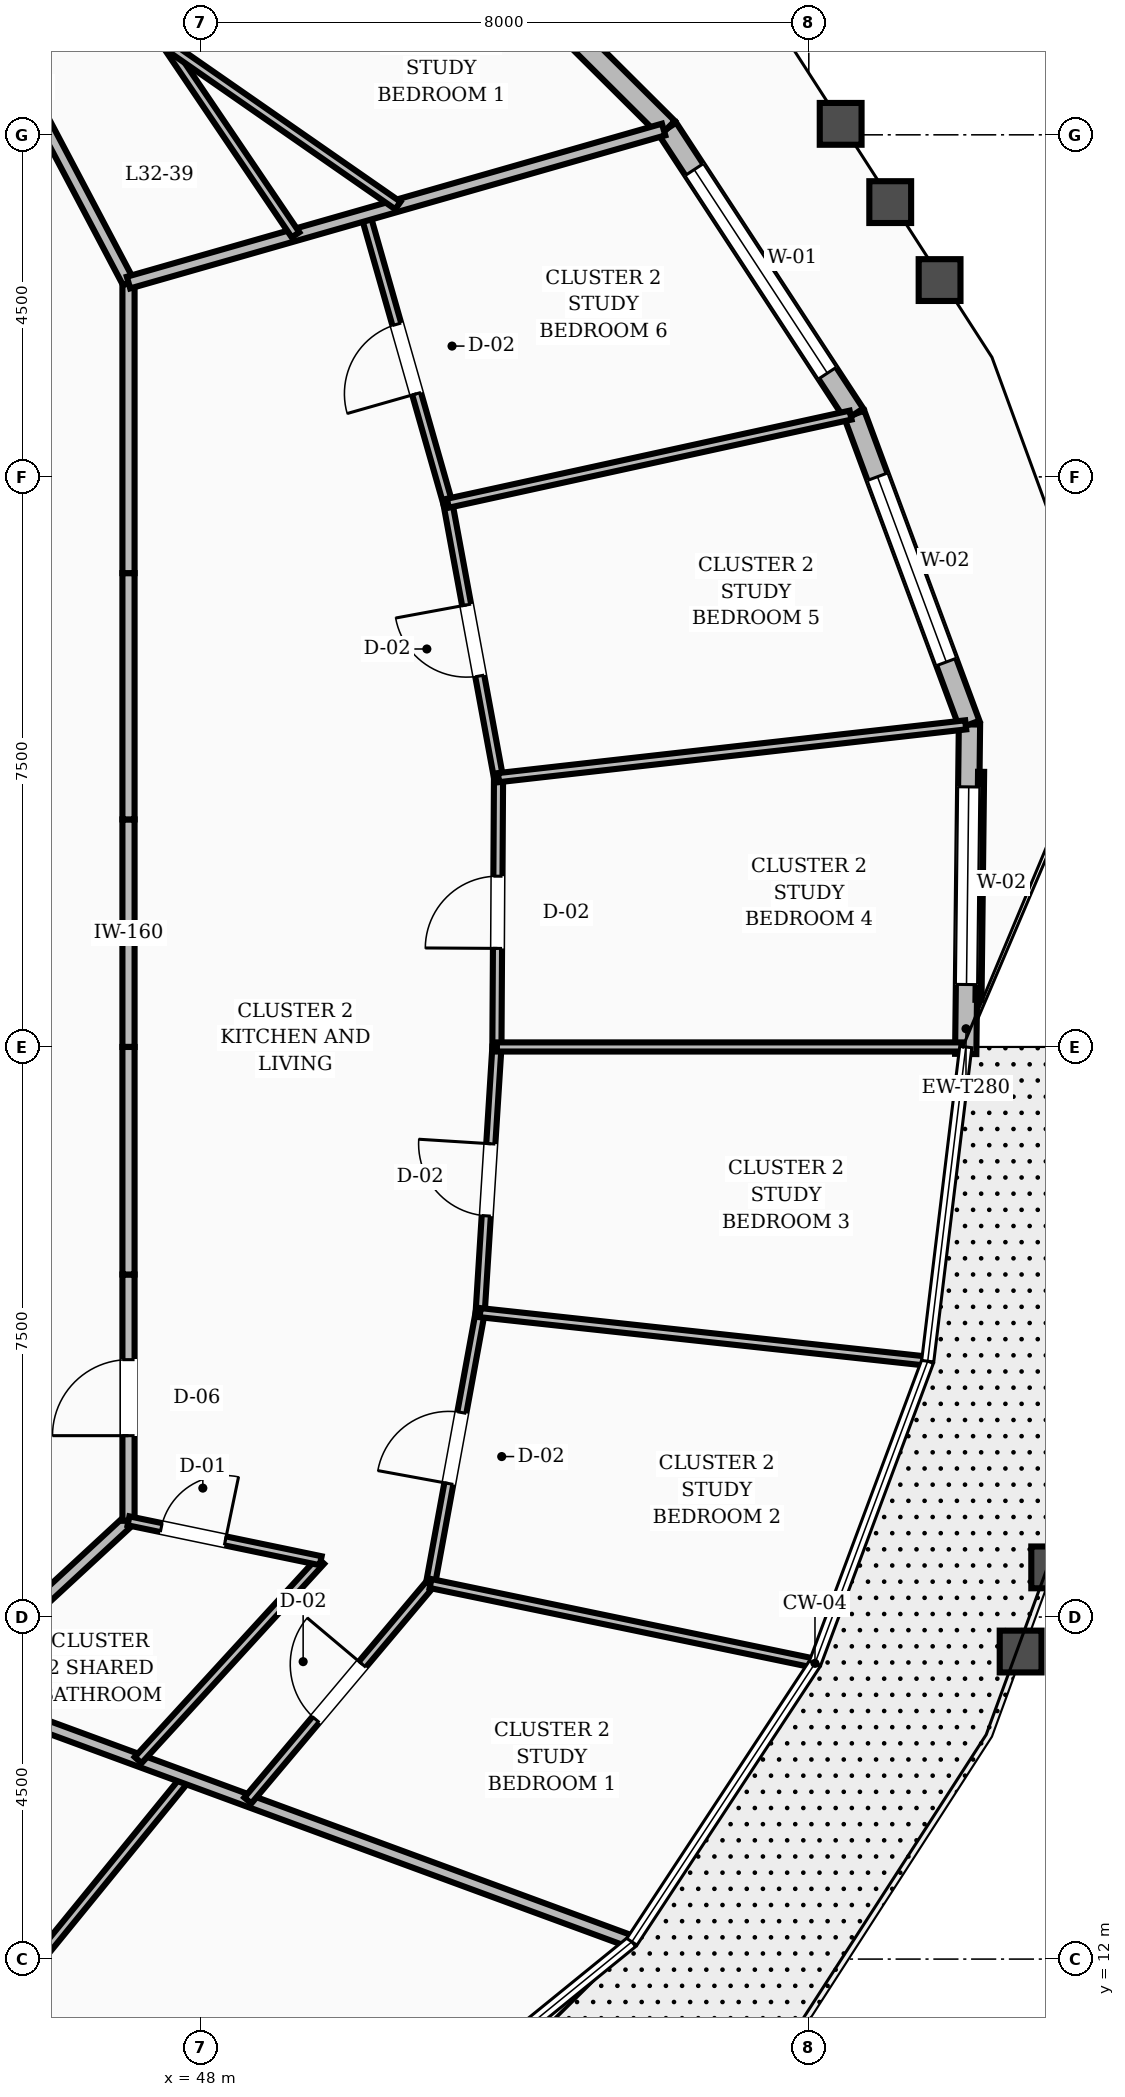
"""IFC4 building model, lengths in metres.
Left out: names, types, materials, properties, quantities, classifications, styles, units other than length and angle.
Written with IfcOpenShell. Run it as: python <this file> out.ifc"""

import sys

from ifc_helpers import new_model, si_unit, direction, frame, frame_2d, origin, place, context, subcontext, project, spatial, rectangle, extrude, element, fill, save


model = new_model("IFC4")
c1 = context("Model", 3, precision=1e-05, world=origin(), true_north=direction((0.0, 1.0)))
c2 = subcontext(c1, "Body", "Model", "MODEL_VIEW")
j1 = project(units=[si_unit("LENGTHUNIT", "METRE"), si_unit("PLANEANGLEUNIT", "RADIAN")], contexts=[c1])
p1 = place(None, origin())
s1 = spatial("IfcSite", under=j1, at=p1, CompositionType="ELEMENT")
p2 = place(p1, origin())
s2 = spatial("IfcBuilding", under=s1, at=p2, CompositionType="ELEMENT")
p3 = place(p2, frame((0.0, 0.0, 128.0)))
s3 = spatial("IfcBuildingStorey", under=s2, at=p3, CompositionType="ELEMENT", Elevation=128.0)
p4 = place(p3, frame((58.064, 23.908, 0.0), z_axis=(0.0, 0.0, 1.0), x_axis=(0.011431364304, 0.99993465982, 0.0)))
e1 = element("IfcWall", 1, at=p4, inside=s3, PredefinedType="STANDARD", context=c2, shape_type="SweptSolid", body=[
    extrude(rectangle(XDim=4.335, YDim=0.28, at=frame_2d((2.168, 0.0))), origin(), (0.0, 0.0, 1.0), 2.82),
])
p5 = place(p4, frame((0.914, 0.0, 0.8)))
e2 = element("IfcOpeningElement", 2, at=p5, cuts=e1, PredefinedType="OPENING", context=c2, shape_type="SweptSolid", body=[
    extrude(rectangle(XDim=2.6, YDim=1.65, at=frame_2d((1.3, 0.825))), frame((0.0, 0.15, 0.0), z_axis=(0.0, -1.0, 0.0), x_axis=(1.0, 0.0, 0.0)), (0.0, 0.0, 1.0), 0.3),
])
p6 = place(p3, frame((58.114, 28.243, 0.0), z_axis=(0.0, 0.0, 1.0), x_axis=(-0.348121742576, 0.937449333215, 0.0)))
e3 = element("IfcWall", 3, at=p6, inside=s3, PredefinedType="STANDARD", context=c2, shape_type="SweptSolid", body=[
    extrude(rectangle(XDim=4.352, YDim=0.28, at=frame_2d((2.176, 0.0))), origin(), (0.0, 0.0, 1.0), 2.82),
])
p7 = place(p6, frame((0.876, 0.0, 0.8)))
e4 = element("IfcOpeningElement", 4, at=p7, cuts=e3, PredefinedType="OPENING", context=c2, shape_type="SweptSolid", body=[
    extrude(rectangle(XDim=2.6, YDim=1.65, at=frame_2d((1.3, 0.825))), frame((0.0, 0.15, 0.0), z_axis=(0.0, -1.0, 0.0), x_axis=(1.0, 0.0, 0.0)), (0.0, 0.0, 1.0), 0.3),
])
p8 = place(p3, frame((56.599, 32.323, 0.0), z_axis=(0.0, 0.0, 1.0), x_axis=(-0.547571349255, 0.836758996053, 0.0)))
e5 = element("IfcWall", 5, at=p8, inside=s3, PredefinedType="STANDARD", context=c2, shape_type="SweptSolid", body=[
    extrude(rectangle(XDim=4.494, YDim=0.28, at=frame_2d((2.247, 0.0))), origin(), (0.0, 0.0, 1.0), 2.82),
])
p9 = place(p8, frame((0.647, 0.0, 0.8)))
e6 = element("IfcOpeningElement", 6, at=p9, cuts=e5, PredefinedType="OPENING", context=c2, shape_type="SweptSolid", body=[
    extrude(rectangle(XDim=3.2, YDim=1.65, at=frame_2d((1.6, 0.825))), frame((0.0, 0.15, 0.0), z_axis=(0.0, -1.0, 0.0), x_axis=(1.0, 0.0, 0.0)), (0.0, 0.0, 1.0), 0.3),
])
p10 = place(p3, frame((54.138, 36.083, 0.0), z_axis=(0.0, 0.0, 1.0), x_axis=(-0.708724927863, 0.705484923032, 0.0)))
e7 = element("IfcWall", 7, at=p10, inside=s3, PredefinedType="STANDARD", context=c2, shape_type="SweptSolid", body=[
    extrude(rectangle(XDim=4.672, YDim=0.28, at=frame_2d((2.336, 0.0))), origin(), (0.0, 0.0, 1.0), 2.82),
])
p11 = place(p3, frame((47.05, 24.0, 0.0), z_axis=(0.0, 0.0, 1.0), x_axis=(0.0, 1.0, 0.0)))
e8 = element("IfcWall", 8, at=p11, inside=s3, PredefinedType="SOLIDWALL", context=c2, shape_type="SweptSolid", body=[
    extrude(rectangle(XDim=2.994, YDim=0.16, at=frame_2d((1.497, 0.0))), origin(), (0.0, 0.0, 1.0), 2.8),
])
p12 = place(p3, frame((47.05, 26.994, 0.0), z_axis=(0.0, 0.0, 1.0), x_axis=(0.0, 1.0, 0.0)))
e9 = element("IfcWall", 9, at=p12, inside=s3, PredefinedType="SOLIDWALL", context=c2, shape_type="SweptSolid", body=[
    extrude(rectangle(XDim=3.24, YDim=0.16, at=frame_2d((1.62, 0.0))), origin(), (0.0, 0.0, 1.0), 2.8),
])
p13 = place(p3, frame((47.05, 30.234, 0.0), z_axis=(0.0, 0.0, 1.0), x_axis=(0.0, 1.0, 0.0)))
e10 = element("IfcWall", 10, at=p13, inside=s3, PredefinedType="SOLIDWALL", context=c2, shape_type="SweptSolid", body=[
    extrude(rectangle(XDim=3.822, YDim=0.16, at=frame_2d((1.911, 0.0))), origin(), (0.0, 0.0, 1.0), 2.8),
])
p14 = place(p3, frame((47.05, 34.056, 0.0), z_axis=(0.0, 0.0, 1.0), x_axis=(-0.466737093093, 0.884396113702, 0.0)))
e11 = element("IfcWall", 11, at=p14, inside=s3, PredefinedType="SOLIDWALL", context=c2, shape_type="SweptSolid", body=[
    extrude(rectangle(XDim=3.696, YDim=0.16, at=frame_2d((1.848, 0.0))), origin(), (0.0, 0.0, 1.0), 2.8),
])
p15 = place(p3, frame((44.65, 15.548, 0.0), z_axis=(0.0, 0.0, 1.0), x_axis=(0.734347936521, 0.678773237633, 0.0)))
e12 = element("IfcWall", 12, at=p15, inside=s3, PredefinedType="SOLIDWALL", context=c2, shape_type="SweptSolid", body=[
    extrude(rectangle(XDim=3.268, YDim=0.16, at=frame_2d((1.634, 0.0))), origin(), (0.0, 0.0, 1.0), 2.8),
])
p16 = place(p3, frame((47.05, 17.766, 0.0), z_axis=(0.0, 0.0, 1.0), x_axis=(0.0, 1.0, 0.0)))
e13 = element("IfcWall", 13, at=p16, inside=s3, PredefinedType="SOLIDWALL", context=c2, shape_type="SweptSolid", body=[
    extrude(rectangle(XDim=3.24, YDim=0.16, at=frame_2d((1.62, 0.0))), origin(), (0.0, 0.0, 1.0), 2.8),
])
p17 = place(p16, frame((1.12, 0.0, 0.0)))
e14 = element("IfcOpeningElement", 14, at=p17, cuts=e13, PredefinedType="OPENING", context=c2, shape_type="SweptSolid", body=[
    extrude(rectangle(XDim=1.0, YDim=2.1, at=frame_2d((0.5, 1.05))), frame((0.0, 0.09, 0.0), z_axis=(0.0, -1.0, 0.0), x_axis=(1.0, 0.0, 0.0)), (0.0, 0.0, 1.0), 0.18),
])
p18 = place(p3, frame((47.05, 21.006, 0.0), z_axis=(0.0, 0.0, 1.0), x_axis=(0.0, 1.0, 0.0)))
e15 = element("IfcWall", 15, at=p18, inside=s3, PredefinedType="SOLIDWALL", context=c2, shape_type="SweptSolid", body=[
    extrude(rectangle(XDim=2.994, YDim=0.16, at=frame_2d((1.497, 0.0))), origin(), (0.0, 0.0, 1.0), 2.8),
])
p19 = place(p3, frame((45.568, 11.638, 0.0), z_axis=(0.0, 0.0, 1.0), x_axis=(0.631833921948, 0.775103796324, 0.0)))
e16 = element("IfcWall", 16, at=p19, inside=s3, PredefinedType="PARTITIONING", context=c2, shape_type="SweptSolid", body=[
    extrude(rectangle(XDim=3.544, YDim=0.12, at=frame_2d((1.772, 0.0))), origin(), (0.0, 0.0, 1.0), 2.8),
])
p20 = place(p3, frame((44.65, 15.548, 0.0), z_axis=(0.0, 0.0, 1.0), x_axis=(0.938483808639, -0.345323241215, 0.0)))
e17 = element("IfcWall", 17, at=p20, inside=s3, PredefinedType="SOLIDWALL", context=c2, shape_type="SweptSolid", body=[
    extrude(rectangle(XDim=9.564, YDim=0.16, at=frame_2d((4.782, 0.0))), origin(), (0.0, 0.0, 1.0), 2.8),
])
p21 = place(p3, frame((47.177, 14.618, 0.0), z_axis=(0.0, 0.0, 1.0), x_axis=(0.675367129761, 0.737481687935, 0.0)))
e18 = element("IfcWall", 18, at=p21, inside=s3, PredefinedType="PARTITIONING", context=c2, shape_type="SweptSolid", body=[
    extrude(rectangle(XDim=3.557, YDim=0.12, at=frame_2d((1.779, 0.0))), origin(), (0.0, 0.0, 1.0), 2.8),
])
p22 = place(p3, frame((47.05, 17.766, 0.0), z_axis=(0.0, 0.0, 1.0), x_axis=(0.979129578615, -0.203236975673, 0.0)))
e19 = element("IfcWall", 19, at=p22, inside=s3, PredefinedType="PARTITIONING", context=c2, shape_type="SweptSolid", body=[
    extrude(rectangle(XDim=2.583, YDim=0.12, at=frame_2d((1.292, 0.0))), origin(), (0.0, 0.0, 1.0), 2.8),
])
p23 = place(p22, frame((0.44, 0.0, 0.0)))
e20 = element("IfcOpeningElement", 20, at=p23, cuts=e19, PredefinedType="OPENING", context=c2, shape_type="SweptSolid", body=[
    extrude(rectangle(XDim=0.86, YDim=2.1, at=frame_2d((0.43, 1.05))), frame((0.0, 0.07, 0.0), z_axis=(0.0, -1.0, 0.0), x_axis=(1.0, 0.0, 0.0)), (0.0, 0.0, 1.0), 0.14),
])
p24 = place(p3, frame((48.62, 14.087, 0.0), z_axis=(0.0, 0.0, 1.0), x_axis=(0.644101495502, 0.764940039148, 0.0)))
e21 = element("IfcWall", 21, at=p24, inside=s3, PredefinedType="PARTITIONING", context=c2, shape_type="SweptSolid", body=[
    extrude(rectangle(XDim=3.732, YDim=0.12, at=frame_2d((1.866, 0.0))), origin(), (0.0, 0.0, 1.0), 2.8),
])
p25 = place(p24, frame((1.391, 0.0, 0.0)))
e22 = element("IfcOpeningElement", 22, at=p25, cuts=e21, PredefinedType="OPENING", context=c2, shape_type="SweptSolid", body=[
    extrude(rectangle(XDim=0.95, YDim=2.1, at=frame_2d((0.475, 1.05))), frame((0.0, 0.07, 0.0), z_axis=(0.0, -1.0, 0.0), x_axis=(1.0, 0.0, 0.0)), (0.0, 0.0, 1.0), 0.14),
])
p26 = place(p3, frame((51.024, 16.941, 0.0), z_axis=(0.0, 0.0, 1.0), x_axis=(0.180201816071, 0.983629658705, 0.0)))
e23 = element("IfcWall", 23, at=p26, inside=s3, PredefinedType="PARTITIONING", context=c2, shape_type="SweptSolid", body=[
    extrude(rectangle(XDim=3.623, YDim=0.12, at=frame_2d((1.812, 0.0))), origin(), (0.0, 0.0, 1.0), 2.8),
])
p27 = place(p26, frame((1.336, 0.0, 0.0)))
e24 = element("IfcOpeningElement", 24, at=p27, cuts=e23, PredefinedType="OPENING", context=c2, shape_type="SweptSolid", body=[
    extrude(rectangle(XDim=0.95, YDim=2.1, at=frame_2d((0.475, 1.05))), frame((0.0, 0.07, 0.0), z_axis=(0.0, -1.0, 0.0), x_axis=(1.0, 0.0, 0.0)), (0.0, 0.0, 1.0), 0.14),
])
p28 = place(p3, frame((51.024, 16.941, 0.0), z_axis=(0.0, 0.0, 1.0), x_axis=(0.979115199633, -0.203306236617, 0.0)))
e25 = element("IfcWall", 25, at=p28, inside=s3, PredefinedType="PARTITIONING", context=c2, shape_type="SweptSolid", body=[
    extrude(rectangle(XDim=5.116, YDim=0.12, at=frame_2d((2.558, 0.0))), origin(), (0.0, 0.0, 1.0), 2.8),
])
p29 = place(p3, frame((51.677, 20.505, 0.0), z_axis=(0.0, 0.0, 1.0), x_axis=(0.062877361001, 0.998021261033, 0.0)))
e26 = element("IfcWall", 26, at=p29, inside=s3, PredefinedType="PARTITIONING", context=c2, shape_type="SweptSolid", body=[
    extrude(rectangle(XDim=3.502, YDim=0.12, at=frame_2d((1.751, 0.0))), origin(), (0.0, 0.0, 1.0), 2.8),
])
p30 = place(p29, frame((1.276, 0.0, 0.0)))
e27 = element("IfcOpeningElement", 27, at=p30, cuts=e26, PredefinedType="OPENING", context=c2, shape_type="SweptSolid", body=[
    extrude(rectangle(XDim=0.95, YDim=2.1, at=frame_2d((0.475, 1.05))), frame((0.0, 0.07, 0.0), z_axis=(0.0, -1.0, 0.0), x_axis=(1.0, 0.0, 0.0)), (0.0, 0.0, 1.0), 0.14),
])
p31 = place(p3, frame((51.677, 20.505, 0.0), z_axis=(0.0, 0.0, 1.0), x_axis=(0.994172778385, -0.107798361393, 0.0)))
e28 = element("IfcWall", 28, at=p31, inside=s3, PredefinedType="PARTITIONING", context=c2, shape_type="SweptSolid", body=[
    extrude(rectangle(XDim=5.873, YDim=0.12, at=frame_2d((2.936, 0.0))), origin(), (0.0, 0.0, 1.0), 2.8),
])
p32 = place(p3, frame((51.897, 24.0, 0.0), z_axis=(0.0, 0.0, 1.0), x_axis=(0.006063000038, 0.999981619846, 0.0)))
e29 = element("IfcWall", 29, at=p32, inside=s3, PredefinedType="PARTITIONING", context=c2, shape_type="SweptSolid", body=[
    extrude(rectangle(XDim=3.543, YDim=0.12, at=frame_2d((1.772, 0.0))), origin(), (0.0, 0.0, 1.0), 2.8),
])
p33 = place(p32, frame((1.297, 0.0, 0.0)))
e30 = element("IfcOpeningElement", 30, at=p33, cuts=e29, PredefinedType="OPENING", context=c2, shape_type="SweptSolid", body=[
    extrude(rectangle(XDim=0.95, YDim=2.1, at=frame_2d((0.475, 1.05))), frame((0.0, 0.07, 0.0), z_axis=(0.0, -1.0, 0.0), x_axis=(1.0, 0.0, 0.0)), (0.0, 0.0, 1.0), 0.14),
])
p34 = place(p3, frame((51.897, 24.0, 0.0), z_axis=(0.0, 0.0, 1.0), x_axis=(1.0, 0.0, 0.0)))
e31 = element("IfcWall", 31, at=p34, inside=s3, PredefinedType="PARTITIONING", context=c2, shape_type="SweptSolid", body=[
    extrude(rectangle(XDim=6.119, YDim=0.12, at=frame_2d((3.059, 0.0))), origin(), (0.0, 0.0, 1.0), 2.8),
])
p35 = place(p3, frame((51.918, 27.543, 0.0), z_axis=(0.0, 0.0, 1.0), x_axis=(-0.181629603626, 0.983367015456, 0.0)))
e32 = element("IfcWall", 32, at=p35, inside=s3, PredefinedType="PARTITIONING", context=c2, shape_type="SweptSolid", body=[
    extrude(rectangle(XDim=3.671, YDim=0.12, at=frame_2d((1.835, 0.0))), origin(), (0.0, 0.0, 1.0), 2.8),
])
p36 = place(p35, frame((1.36, 0.0, 0.0)))
e33 = element("IfcOpeningElement", 33, at=p36, cuts=e32, PredefinedType="OPENING", context=c2, shape_type="SweptSolid", body=[
    extrude(rectangle(XDim=0.95, YDim=2.1, at=frame_2d((0.475, 1.05))), frame((0.0, 0.07, 0.0), z_axis=(0.0, -1.0, 0.0), x_axis=(1.0, 0.0, 0.0)), (0.0, 0.0, 1.0), 0.14),
])
p37 = place(p3, frame((51.918, 27.543, 0.0), z_axis=(0.0, 0.0, 1.0), x_axis=(0.993683316952, 0.112220611349, 0.0)))
e34 = element("IfcWall", 34, at=p37, inside=s3, PredefinedType="PARTITIONING", context=c2, shape_type="SweptSolid", body=[
    extrude(rectangle(XDim=6.185, YDim=0.12, at=frame_2d((3.093, 0.0))), origin(), (0.0, 0.0, 1.0), 2.8),
])
p38 = place(p3, frame((51.251, 31.153, 0.0), z_axis=(0.0, 0.0, 1.0), x_axis=(-0.274312555961, 0.9616405886, 0.0)))
e35 = element("IfcWall", 35, at=p38, inside=s3, PredefinedType="PARTITIONING", context=c2, shape_type="SweptSolid", body=[
    extrude(rectangle(XDim=3.946, YDim=0.12, at=frame_2d((1.973, 0.0))), origin(), (0.0, 0.0, 1.0), 2.8),
])
p39 = place(p38, frame((1.498, 0.0, 0.0)))
e36 = element("IfcOpeningElement", 36, at=p39, cuts=e35, PredefinedType="OPENING", context=c2, shape_type="SweptSolid", body=[
    extrude(rectangle(XDim=0.95, YDim=2.1, at=frame_2d((0.475, 1.05))), frame((0.0, 0.07, 0.0), z_axis=(0.0, -1.0, 0.0), x_axis=(1.0, 0.0, 0.0)), (0.0, 0.0, 1.0), 0.14),
])
p40 = place(p3, frame((51.251, 31.153, 0.0), z_axis=(0.0, 0.0, 1.0), x_axis=(0.976895612472, 0.213717014607, 0.0)))
e37 = element("IfcWall", 37, at=p40, inside=s3, PredefinedType="PARTITIONING", context=c2, shape_type="SweptSolid", body=[
    extrude(rectangle(XDim=5.424, YDim=0.12, at=frame_2d((2.712, 0.0))), origin(), (0.0, 0.0, 1.0), 2.8),
])
p41 = place(p3, frame((47.05, 34.056, 0.0), z_axis=(0.0, 0.0, 1.0), x_axis=(0.961443382808, 0.275002948446, 0.0)))
e38 = element("IfcWall", 38, at=p41, inside=s3, PredefinedType="SOLIDWALL", context=c2, shape_type="SweptSolid", body=[
    extrude(rectangle(XDim=7.322, YDim=0.16, at=frame_2d((3.661, 0.0))), origin(), (0.0, 0.0, 1.0), 2.8),
])
p42 = place(p3, frame((49.247, 34.685, 0.0), z_axis=(0.0, 0.0, 1.0), x_axis=(-0.560227188168, 0.828338999225, 0.0)))
e39 = element("IfcWall", 39, at=p42, inside=s3, PredefinedType="PARTITIONING", context=c2, shape_type="SweptSolid", body=[
    extrude(rectangle(XDim=3.957, YDim=0.12, at=frame_2d((1.978, 0.0))), origin(), (0.0, 0.0, 1.0), 2.8),
])
p43 = place(p3, frame((50.594, 35.07, 0.0), z_axis=(0.0, 0.0, 1.0), x_axis=(-0.821081459347, 0.570811034508, 0.0)))
e40 = element("IfcWall", 40, at=p43, inside=s3, PredefinedType="PARTITIONING", context=c2, shape_type="SweptSolid", body=[
    extrude(rectangle(XDim=8.186, YDim=0.12, at=frame_2d((4.093, 0.0))), origin(), (0.0, 0.0, 1.0), 2.8),
])
p44 = place(p43, frame((5.016, 0.0, 0.0)))
e41 = element("IfcOpeningElement", 41, at=p44, cuts=e40, PredefinedType="OPENING", context=c2, shape_type="SweptSolid", body=[
    extrude(rectangle(XDim=0.95, YDim=2.1, at=frame_2d((0.475, 1.05))), frame((0.0, 0.07, 0.0), z_axis=(0.0, -1.0, 0.0), x_axis=(1.0, 0.0, 0.0)), (0.0, 0.0, 1.0), 0.14),
])
p45 = place(p5, origin())
e42 = element("IfcWindow", 42, at=p45, inside=s3, PartitioningType="SINGLE_PANEL", PredefinedType="WINDOW", context=c2, shape_type="SweptSolid", body=[
    extrude(rectangle(XDim=2.6, YDim=1.65, at=frame_2d((1.3, 0.825))), frame((0.0, 0.03, 0.0), z_axis=(0.0, -1.0, 0.0), x_axis=(1.0, 0.0, 0.0)), (0.0, 0.0, 1.0), 0.06),
])
fill(e2, e42)
p46 = place(p7, origin())
e43 = element("IfcWindow", 43, at=p46, inside=s3, PartitioningType="SINGLE_PANEL", PredefinedType="WINDOW", context=c2, shape_type="SweptSolid", body=[
    extrude(rectangle(XDim=2.6, YDim=1.65, at=frame_2d((1.3, 0.825))), frame((0.0, 0.03, 0.0), z_axis=(0.0, -1.0, 0.0), x_axis=(1.0, 0.0, 0.0)), (0.0, 0.0, 1.0), 0.06),
])
fill(e4, e43)
p47 = place(p9, origin())
e44 = element("IfcWindow", 44, at=p47, inside=s3, PartitioningType="SINGLE_PANEL", PredefinedType="WINDOW", context=c2, shape_type="SweptSolid", body=[
    extrude(rectangle(XDim=3.2, YDim=1.65, at=frame_2d((1.6, 0.825))), frame((0.0, 0.03, 0.0), z_axis=(0.0, -1.0, 0.0), x_axis=(1.0, 0.0, 0.0)), (0.0, 0.0, 1.0), 0.06),
])
fill(e6, e44)
p48 = place(p23, origin())
e45 = element("IfcDoor", 45, at=p48, inside=s3, OperationType="SINGLE_SWING_RIGHT", PredefinedType="DOOR", context=c2, shape_type="SweptSolid", body=[
    extrude(rectangle(XDim=0.86, YDim=2.1, at=frame_2d((0.43, 1.05))), frame((0.0, 0.025, 0.0), z_axis=(0.0, -1.0, 0.0), x_axis=(1.0, 0.0, 0.0)), (0.0, 0.0, 1.0), 0.05),
])
fill(e20, e45)
p49 = place(p17, origin())
e46 = element("IfcDoor", 46, at=p49, inside=s3, OperationType="SINGLE_SWING_LEFT", PredefinedType="DOOR", context=c2, shape_type="SweptSolid", body=[
    extrude(rectangle(XDim=1.0, YDim=2.1, at=frame_2d((0.5, 1.05))), frame((0.0, 0.025, 0.0), z_axis=(0.0, -1.0, 0.0), x_axis=(1.0, 0.0, 0.0)), (0.0, 0.0, 1.0), 0.05),
])
fill(e14, e46)
p50 = place(p25, origin())
e47 = element("IfcDoor", 47, at=p50, inside=s3, OperationType="SINGLE_SWING_RIGHT", PredefinedType="DOOR", context=c2, shape_type="SweptSolid", body=[
    extrude(rectangle(XDim=0.95, YDim=2.1, at=frame_2d((0.475, 1.05))), frame((0.0, 0.025, 0.0), z_axis=(0.0, -1.0, 0.0), x_axis=(1.0, 0.0, 0.0)), (0.0, 0.0, 1.0), 0.05),
])
fill(e22, e47)
p51 = place(p27, origin())
e48 = element("IfcDoor", 48, at=p51, inside=s3, OperationType="SINGLE_SWING_LEFT", PredefinedType="DOOR", context=c2, shape_type="SweptSolid", body=[
    extrude(rectangle(XDim=0.95, YDim=2.1, at=frame_2d((0.475, 1.05))), frame((0.0, 0.025, 0.0), z_axis=(0.0, -1.0, 0.0), x_axis=(1.0, 0.0, 0.0)), (0.0, 0.0, 1.0), 0.05),
])
fill(e24, e48)
p52 = place(p30, origin())
e49 = element("IfcDoor", 49, at=p52, inside=s3, OperationType="SINGLE_SWING_RIGHT", PredefinedType="DOOR", context=c2, shape_type="SweptSolid", body=[
    extrude(rectangle(XDim=0.95, YDim=2.1, at=frame_2d((0.475, 1.05))), frame((0.0, 0.025, 0.0), z_axis=(0.0, -1.0, 0.0), x_axis=(1.0, 0.0, 0.0)), (0.0, 0.0, 1.0), 0.05),
])
fill(e27, e49)
p53 = place(p33, origin())
e50 = element("IfcDoor", 50, at=p53, inside=s3, OperationType="SINGLE_SWING_LEFT", PredefinedType="DOOR", context=c2, shape_type="SweptSolid", body=[
    extrude(rectangle(XDim=0.95, YDim=2.1, at=frame_2d((0.475, 1.05))), frame((0.0, 0.025, 0.0), z_axis=(0.0, -1.0, 0.0), x_axis=(1.0, 0.0, 0.0)), (0.0, 0.0, 1.0), 0.05),
])
fill(e30, e50)
p54 = place(p36, origin())
e51 = element("IfcDoor", 51, at=p54, inside=s3, OperationType="SINGLE_SWING_RIGHT", PredefinedType="DOOR", context=c2, shape_type="SweptSolid", body=[
    extrude(rectangle(XDim=0.95, YDim=2.1, at=frame_2d((0.475, 1.05))), frame((0.0, 0.025, 0.0), z_axis=(0.0, -1.0, 0.0), x_axis=(1.0, 0.0, 0.0)), (0.0, 0.0, 1.0), 0.05),
])
fill(e33, e51)
p55 = place(p39, origin())
e52 = element("IfcDoor", 52, at=p55, inside=s3, OperationType="SINGLE_SWING_LEFT", PredefinedType="DOOR", context=c2, shape_type="SweptSolid", body=[
    extrude(rectangle(XDim=0.95, YDim=2.1, at=frame_2d((0.475, 1.05))), frame((0.0, 0.025, 0.0), z_axis=(0.0, -1.0, 0.0), x_axis=(1.0, 0.0, 0.0)), (0.0, 0.0, 1.0), 0.05),
])
fill(e36, e52)
save(model, sys.argv[1])
